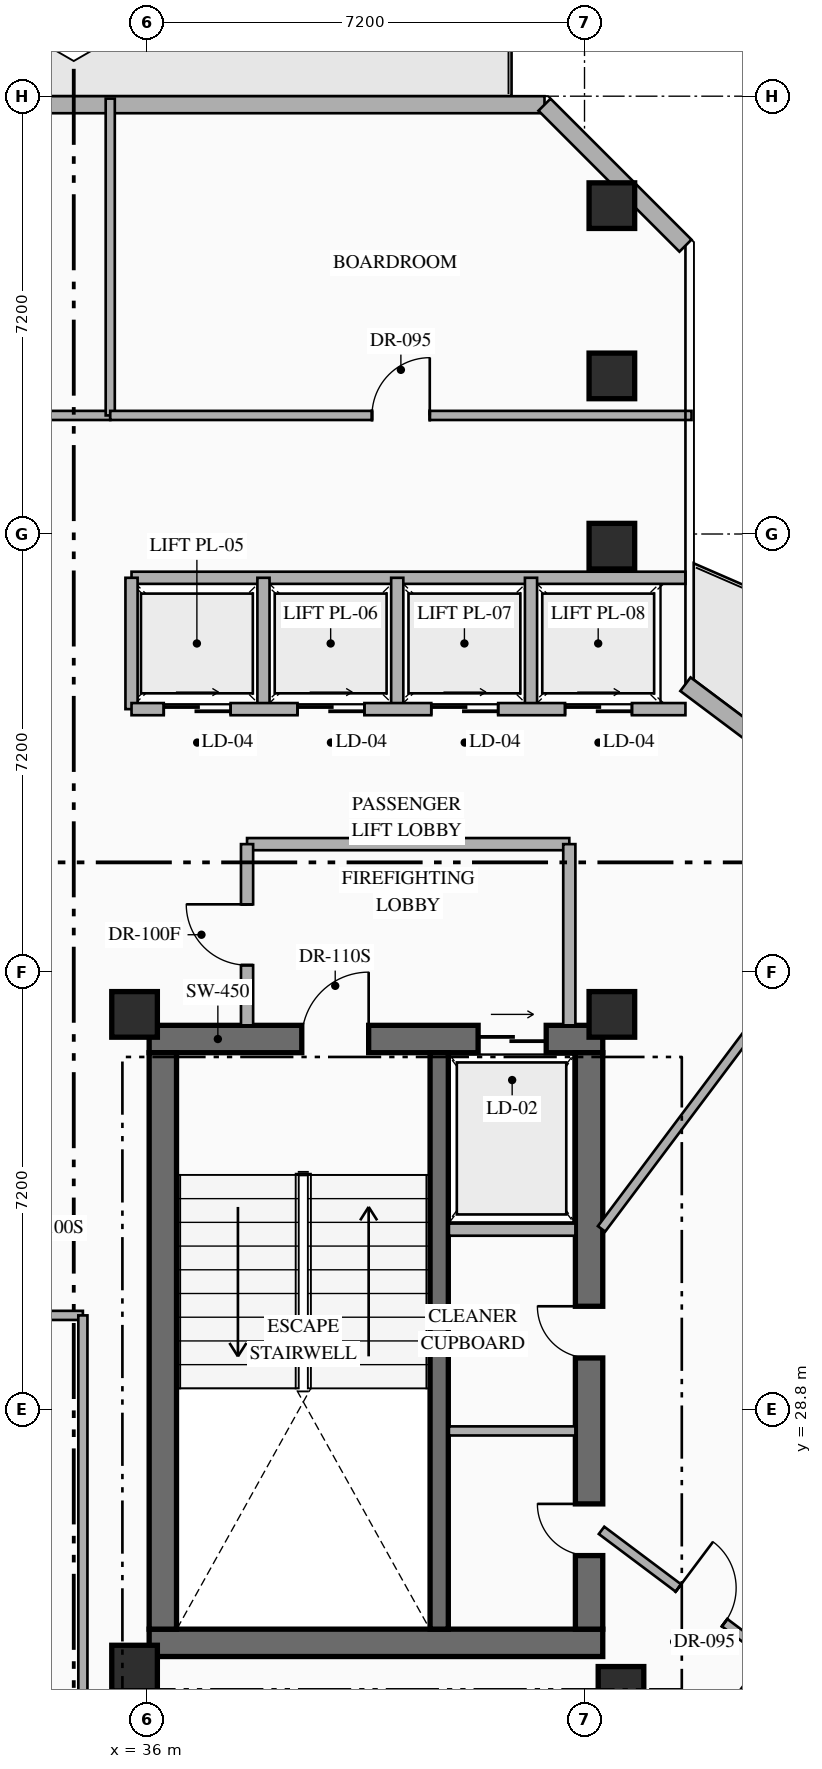
"""IFC4 building model, lengths in metres.
Left out: names, types, materials, properties, quantities, classifications, styles, units other than length and angle.
Written with IfcOpenShell. Run it as: python <this file> out.ifc"""

import sys

from ifc_helpers import new_model, si_unit, direction, frame, frame_2d, origin, origin_2d, place, context, subcontext, project, spatial, rectangle, hollow_rectangle, extrude, element, fill, save


model = new_model("IFC4")
c1 = context("Model", 3, precision=1e-05, world=origin(), true_north=direction((0.0, 1.0)))
c2 = subcontext(c1, "Body", "Model", "MODEL_VIEW")
j1 = project(units=[si_unit("LENGTHUNIT", "METRE"), si_unit("PLANEANGLEUNIT", "RADIAN")], contexts=[c1])
p1 = place(None, origin())
s1 = spatial("IfcSite", under=j1, at=p1, CompositionType="ELEMENT")
p2 = place(p1, origin())
s2 = spatial("IfcBuilding", under=s1, at=p2, CompositionType="ELEMENT")
p3 = place(p2, frame((0.0, 0.0, 202.35)))
s3 = spatial("IfcBuildingStorey", under=s2, at=p3, CompositionType="ELEMENT", Elevation=202.35)
p4 = place(p3, frame((36.04, 24.965, 0.0), z_axis=(0.0, 0.0, 1.0), x_axis=(1.0, 0.0, 0.0)))
e1 = element("IfcWall", 1, at=p4, inside=s3, PredefinedType="SHEAR", context=c2, shape_type="SweptSolid", body=[
    extrude(rectangle(XDim=7.46, YDim=0.45, at=frame_2d((3.73, 0.0))), origin(), (0.0, 0.0, 1.0), 3.6),
])
p5 = place(p3, frame((36.04, 34.895, 0.0), z_axis=(0.0, 0.0, 1.0), x_axis=(1.0, 0.0, 0.0)))
e2 = element("IfcWall", 2, at=p5, inside=s3, PredefinedType="SHEAR", context=c2, shape_type="SweptSolid", body=[
    extrude(rectangle(XDim=7.46, YDim=0.45, at=frame_2d((3.73, 0.0))), origin(), (0.0, 0.0, 1.0), 3.6),
])
p6 = place(p5, frame((2.51, 0.0, 0.0)))
e3 = element("IfcOpeningElement", 3, at=p6, cuts=e2, PredefinedType="OPENING", context=c2, shape_type="SweptSolid", body=[
    extrude(rectangle(XDim=1.1, YDim=2.2, at=frame_2d((0.55, 1.1))), frame((0.0, 0.235, 0.0), z_axis=(0.0, -1.0, 0.0), x_axis=(1.0, 0.0, 0.0)), (0.0, 0.0, 1.0), 0.47),
])
p7 = place(p5, frame((5.41, 0.0, 0.0)))
e4 = element("IfcOpeningElement", 4, at=p7, cuts=e2, PredefinedType="OPENING", context=c2, shape_type="SweptSolid", body=[
    extrude(rectangle(XDim=1.12, YDim=2.15, at=frame_2d((0.56, 1.075))), frame((0.0, 0.235, 0.0), z_axis=(0.0, -1.0, 0.0), x_axis=(1.0, 0.0, 0.0)), (0.0, 0.0, 1.0), 0.47),
])
p8 = place(p3, frame((36.265, 25.19, 0.0), z_axis=(0.0, 0.0, 1.0), x_axis=(0.0, 1.0, 0.0)))
e5 = element("IfcWall", 5, at=p8, inside=s3, PredefinedType="SHEAR", context=c2, shape_type="SweptSolid", body=[
    extrude(rectangle(XDim=9.48, YDim=0.45, at=frame_2d((4.74, 0.0))), origin(), (0.0, 0.0, 1.0), 3.6),
])
p9 = place(p3, frame((43.275, 25.19, 0.0), z_axis=(0.0, 0.0, 1.0), x_axis=(0.0, 1.0, 0.0)))
e6 = element("IfcWall", 6, at=p9, inside=s3, PredefinedType="SHEAR", context=c2, shape_type="SweptSolid", body=[
    extrude(rectangle(XDim=9.48, YDim=0.45, at=frame_2d((4.74, 0.0))), origin(), (0.0, 0.0, 1.0), 3.6),
])
p10 = place(p9, frame((1.21, 0.0, 0.0)))
e7 = element("IfcOpeningElement", 7, at=p10, cuts=e6, PredefinedType="OPENING", context=c2, shape_type="SweptSolid", body=[
    extrude(rectangle(XDim=0.85, YDim=2.08, at=frame_2d((0.425, 1.04))), frame((0.0, 0.235, 0.0), z_axis=(0.0, -1.0, 0.0), x_axis=(1.0, 0.0, 0.0)), (0.0, 0.0, 1.0), 0.47),
])
p11 = place(p9, frame((4.46, 0.0, 0.0)))
e8 = element("IfcOpeningElement", 8, at=p11, cuts=e6, PredefinedType="OPENING", context=c2, shape_type="SweptSolid", body=[
    extrude(rectangle(XDim=0.85, YDim=2.08, at=frame_2d((0.425, 1.04))), frame((0.0, 0.235, 0.0), z_axis=(0.0, -1.0, 0.0), x_axis=(1.0, 0.0, 0.0)), (0.0, 0.0, 1.0), 0.47),
])
p12 = place(p3, frame((40.81, 25.19, 0.0), z_axis=(0.0, 0.0, 1.0), x_axis=(0.0, 1.0, 0.0)))
e9 = element("IfcWall", 9, at=p12, inside=s3, PredefinedType="SHEAR", context=c2, shape_type="SweptSolid", body=[
    extrude(rectangle(XDim=9.48, YDim=0.3, at=frame_2d((4.74, 0.0))), origin(), (0.0, 0.0, 1.0), 3.6),
])
for number, where, z_axis, x_axis in (
    (10, (35.8, 24.55, 0.0), (0.0, 0.0, 1.0), (1.0, 0.0, 0.0)),
    (11, (43.8, 24.2, 0.0), (0.0, 0.0, 1.0), (1.0, 0.0, 0.0)),
    (12, (35.8, 35.3, 0.0), (0.0, 0.0, 1.0), (1.0, 0.0, 0.0)),
    (13, (43.65, 35.3, 0.0), (0.0, 0.0, 1.0), (1.0, 0.0, 0.0)),
    (14, (43.65, 43.0, 0.0), (0.0, 0.0, 1.0), (1.0, 0.0, 0.0)),
    (15, (43.65, 45.8, 0.0), (0.0, 0.0, 1.0), (1.0, 0.0, 0.0)),
    (16, (43.65, 48.6, 0.0), (0.0, 0.0, 1.0), (1.0, 0.0, 0.0)),
):
    element("IfcColumn", number, at=place(p3, frame(where, z_axis=z_axis, x_axis=x_axis)), inside=s3, PredefinedType="COLUMN", context=c2, shape_type="SweptSolid", body=[
        extrude(hollow_rectangle(XDim=0.75, YDim=0.75, WallThickness=0.028, at=origin_2d()), origin(), (0.0, 0.0, 1.0), 3.6),
    ])
p13 = place(p3, frame((44.86, 40.73, 0.0), z_axis=(0.0, 0.0, 1.0), x_axis=(0.800007624502, -0.599989833863, 0.0)))
e17 = element("IfcWall", 17, at=p13, inside=s3, PredefinedType="STANDARD", context=c2, shape_type="SweptSolid", body=[
    extrude(rectangle(XDim=19.212, YDim=0.28, at=frame_2d((9.606, 0.0))), origin(), (0.0, 0.0, 1.0), 3.35),
])
p14 = place(p13, frame((1.755, 0.0, 0.0)))
e18 = element("IfcOpeningElement", 18, at=p14, cuts=e17, PredefinedType="OPENING", context=c2, shape_type="SweptSolid", body=[
    extrude(rectangle(XDim=1.1, YDim=2.2, at=frame_2d((0.55, 1.1))), frame((0.0, 0.15, 0.0), z_axis=(0.0, -1.0, 0.0), x_axis=(1.0, 0.0, 0.0)), (0.0, 0.0, 1.0), 0.3),
])
p15 = place(p13, frame((13.509, 0.0, 0.85)))
e19 = element("IfcOpeningElement", 19, at=p15, cuts=e17, PredefinedType="OPENING", context=c2, shape_type="SweptSolid", body=[
    extrude(rectangle(XDim=1.8, YDim=2.1, at=frame_2d((0.9, 1.05))), frame((0.0, 0.15, 0.0), z_axis=(0.0, -1.0, 0.0), x_axis=(1.0, 0.0, 0.0)), (0.0, 0.0, 1.0), 0.3),
])
p16 = place(p3, frame((20.458, 50.26, 0.0), z_axis=(0.0, 0.0, 1.0), x_axis=(1.0, 0.0, 0.0)))
e20 = element("IfcWall", 20, at=p16, inside=s3, PredefinedType="STANDARD", context=c2, shape_type="SweptSolid", body=[
    extrude(rectangle(XDim=22.084, YDim=0.28, at=frame_2d((11.042, 0.0))), origin(), (0.0, 0.0, 1.0), 3.35),
])
p17 = place(p16, frame((2.1, 0.0, 0.0)))
e21 = element("IfcOpeningElement", 21, at=p17, cuts=e20, PredefinedType="OPENING", context=c2, shape_type="SweptSolid", body=[
    extrude(rectangle(XDim=1.1, YDim=2.2, at=frame_2d((0.55, 1.1))), frame((0.0, 0.15, 0.0), z_axis=(0.0, -1.0, 0.0), x_axis=(1.0, 0.0, 0.0)), (0.0, 0.0, 1.0), 0.3),
])
p18 = place(p3, frame((42.542, 50.26, 0.0), z_axis=(0.0, 0.0, 1.0), x_axis=(0.707106781187, -0.707106781187, 0.0)))
e22 = element("IfcWall", 22, at=p18, inside=s3, PredefinedType="STANDARD", context=c2, shape_type="SweptSolid", body=[
    extrude(rectangle(XDim=3.278, YDim=0.28, at=frame_2d((1.639, 0.0))), origin(), (0.0, 0.0, 1.0), 3.35),
])
p19 = place(p3, frame((40.97, 31.76, 0.0), z_axis=(0.0, 0.0, 1.0), x_axis=(1.0, 0.0, 0.0)))
e23 = element("IfcWall", 23, at=p19, inside=s3, PredefinedType="STANDARD", context=c2, shape_type="SweptSolid", body=[
    extrude(rectangle(XDim=2.08, YDim=0.2, at=frame_2d((1.04, 0.0))), origin(), (0.0, 0.0, 1.0), 3.35),
])
p20 = place(p3, frame((40.97, 28.45, 0.0), z_axis=(0.0, 0.0, 1.0), x_axis=(1.0, 0.0, 0.0)))
e24 = element("IfcWall", 24, at=p20, inside=s3, PredefinedType="PARTITIONING", context=c2, shape_type="SweptSolid", body=[
    extrude(rectangle(XDim=2.08, YDim=0.15, at=frame_2d((1.04, 0.0))), origin(), (0.0, 0.0, 1.0), 3.35),
])
p21 = place(p3, frame((37.65, 38.1, 0.0), z_axis=(0.0, 0.0, 1.0), x_axis=(1.0, 0.0, 0.0)))
e25 = element("IfcWall", 25, at=p21, inside=s3, PredefinedType="STANDARD", context=c2, shape_type="SweptSolid", body=[
    extrude(rectangle(XDim=5.3, YDim=0.2, at=frame_2d((2.65, 0.0))), origin(), (0.0, 0.0, 1.0), 3.35),
])
p22 = place(p3, frame((42.95, 35.12, 0.0), z_axis=(0.0, 0.0, 1.0), x_axis=(0.0, 1.0, 0.0)))
e26 = element("IfcWall", 26, at=p22, inside=s3, PredefinedType="STANDARD", context=c2, shape_type="SweptSolid", body=[
    extrude(rectangle(XDim=2.98, YDim=0.2, at=frame_2d((1.49, 0.0))), origin(), (0.0, 0.0, 1.0), 3.35),
])
p23 = place(p3, frame((37.65, 35.12, 0.0), z_axis=(0.0, 0.0, 1.0), x_axis=(0.0, 1.0, 0.0)))
e27 = element("IfcWall", 27, at=p23, inside=s3, PredefinedType="STANDARD", context=c2, shape_type="SweptSolid", body=[
    extrude(rectangle(XDim=2.98, YDim=0.2, at=frame_2d((1.49, 0.0))), origin(), (0.0, 0.0, 1.0), 3.35),
])
p24 = place(p23, frame((0.99, 0.0, 0.0)))
e28 = element("IfcOpeningElement", 28, at=p24, cuts=e27, PredefinedType="OPENING", context=c2, shape_type="SweptSolid", body=[
    extrude(rectangle(XDim=1.0, YDim=2.2, at=frame_2d((0.5, 1.1))), frame((0.0, 0.11, 0.0), z_axis=(0.0, -1.0, 0.0), x_axis=(1.0, 0.0, 0.0)), (0.0, 0.0, 1.0), 0.22),
])
p25 = place(p3, frame((35.75, 42.48, 0.0), z_axis=(0.0, 0.0, 1.0), x_axis=(1.0, 0.0, 0.0)))
e29 = element("IfcWall", 29, at=p25, inside=s3, PredefinedType="STANDARD", context=c2, shape_type="SweptSolid", body=[
    extrude(rectangle(XDim=9.11, YDim=0.2, at=frame_2d((4.555, 0.0))), origin(), (0.0, 0.0, 1.0), 3.35),
])
for number, where, z_axis, x_axis in (
    (30, (35.75, 40.32, 0.0), (0.0, 0.0, 1.0), (0.0, 1.0, 0.0)),
    (31, (37.92, 40.32, 0.0), (0.0, 0.0, 1.0), (0.0, 1.0, 0.0)),
    (32, (40.12, 40.32, 0.0), (0.0, 0.0, 1.0), (0.0, 1.0, 0.0)),
    (33, (42.32, 40.32, 0.0), (0.0, 0.0, 1.0), (0.0, 1.0, 0.0)),
):
    element("IfcWall", number, at=place(p3, frame(where, z_axis=z_axis, x_axis=x_axis)), inside=s3, PredefinedType="STANDARD", context=c2, shape_type="SweptSolid", body=[
        extrude(rectangle(XDim=2.16, YDim=0.2, at=frame_2d((1.08, 0.0))), origin(), (0.0, 0.0, 1.0), 3.35),
    ])
p26 = place(p3, frame((35.75, 40.32, 0.0), z_axis=(0.0, 0.0, 1.0), x_axis=(1.0, 0.0, 0.0)))
e34 = element("IfcWall", 34, at=p26, inside=s3, PredefinedType="STANDARD", context=c2, shape_type="SweptSolid", body=[
    extrude(rectangle(XDim=9.11, YDim=0.2, at=frame_2d((4.555, 0.0))), origin(), (0.0, 0.0, 1.0), 3.35),
])
p27 = place(p26, frame((0.53, 0.0, 0.0)))
e35 = element("IfcOpeningElement", 35, at=p27, cuts=e34, PredefinedType="OPENING", context=c2, shape_type="SweptSolid", body=[
    extrude(rectangle(XDim=1.1, YDim=2.18, at=frame_2d((0.55, 1.09))), frame((0.0, 0.11, 0.0), z_axis=(0.0, -1.0, 0.0), x_axis=(1.0, 0.0, 0.0)), (0.0, 0.0, 1.0), 0.22),
])
p28 = place(p26, frame((2.73, 0.0, 0.0)))
e36 = element("IfcOpeningElement", 36, at=p28, cuts=e34, PredefinedType="OPENING", context=c2, shape_type="SweptSolid", body=[
    extrude(rectangle(XDim=1.1, YDim=2.18, at=frame_2d((0.55, 1.09))), frame((0.0, 0.11, 0.0), z_axis=(0.0, -1.0, 0.0), x_axis=(1.0, 0.0, 0.0)), (0.0, 0.0, 1.0), 0.22),
])
p29 = place(p26, frame((4.93, 0.0, 0.0)))
e37 = element("IfcOpeningElement", 37, at=p29, cuts=e34, PredefinedType="OPENING", context=c2, shape_type="SweptSolid", body=[
    extrude(rectangle(XDim=1.1, YDim=2.18, at=frame_2d((0.55, 1.09))), frame((0.0, 0.11, 0.0), z_axis=(0.0, -1.0, 0.0), x_axis=(1.0, 0.0, 0.0)), (0.0, 0.0, 1.0), 0.22),
])
p30 = place(p26, frame((7.13, 0.0, 0.0)))
e38 = element("IfcOpeningElement", 38, at=p30, cuts=e34, PredefinedType="OPENING", context=c2, shape_type="SweptSolid", body=[
    extrude(rectangle(XDim=1.1, YDim=2.18, at=frame_2d((0.55, 1.09))), frame((0.0, 0.11, 0.0), z_axis=(0.0, -1.0, 0.0), x_axis=(1.0, 0.0, 0.0)), (0.0, 0.0, 1.0), 0.22),
])
p31 = place(p3, frame((25.55, 30.35, 0.0), z_axis=(0.0, 0.0, 1.0), x_axis=(1.0, 0.0, 0.0)))
e39 = element("IfcWall", 39, at=p31, inside=s3, PredefinedType="PARTITIONING", context=c2, shape_type="SweptSolid", body=[
    extrude(rectangle(XDim=9.4, YDim=0.15, at=frame_2d((4.7, 0.0))), origin(), (0.0, 0.0, 1.0), 3.35),
])
p32 = place(p31, frame((7.638, 0.0, 0.0)))
e40 = element("IfcOpeningElement", 40, at=p32, cuts=e39, PredefinedType="OPENING", context=c2, shape_type="SweptSolid", body=[
    extrude(rectangle(XDim=1.0, YDim=2.15, at=frame_2d((0.5, 1.075))), frame((0.0, 0.085, 0.0), z_axis=(0.0, -1.0, 0.0), x_axis=(1.0, 0.0, 0.0)), (0.0, 0.0, 1.0), 0.17),
])
p33 = place(p3, frame((34.95, 23.2, 0.0), z_axis=(0.0, 0.0, 1.0), x_axis=(0.0, 1.0, 0.0)))
e41 = element("IfcWall", 41, at=p33, inside=s3, PredefinedType="PARTITIONING", context=c2, shape_type="SweptSolid", body=[
    extrude(rectangle(XDim=7.15, YDim=0.15, at=frame_2d((3.575, 0.0))), origin(), (0.0, 0.0, 1.0), 3.35),
])
p34 = place(p3, frame((26.8, 45.15, 0.0), z_axis=(0.0, 0.0, 1.0), x_axis=(1.0, 0.0, 0.0)))
e42 = element("IfcWall", 42, at=p34, inside=s3, PredefinedType="PARTITIONING", context=c2, shape_type="SweptSolid", body=[
    extrude(rectangle(XDim=8.6, YDim=0.15, at=frame_2d((4.3, 0.0))), origin(), (0.0, 0.0, 1.0), 3.35),
])
p35 = place(p34, frame((3.825, 0.0, 0.0)))
e43 = element("IfcOpeningElement", 43, at=p35, cuts=e42, PredefinedType="OPENING", context=c2, shape_type="SweptSolid", body=[
    extrude(rectangle(XDim=0.95, YDim=2.15, at=frame_2d((0.475, 1.075))), frame((0.0, 0.085, 0.0), z_axis=(0.0, -1.0, 0.0), x_axis=(1.0, 0.0, 0.0)), (0.0, 0.0, 1.0), 0.17),
])
p36 = place(p3, frame((35.4, 45.15, 0.0), z_axis=(0.0, 0.0, 1.0), x_axis=(0.0, 1.0, 0.0)))
e44 = element("IfcWall", 44, at=p36, inside=s3, PredefinedType="PARTITIONING", context=c2, shape_type="SweptSolid", body=[
    extrude(rectangle(XDim=5.21, YDim=0.15, at=frame_2d((2.605, 0.0))), origin(), (0.0, 0.0, 1.0), 3.35),
])
p37 = place(p3, frame((35.4, 45.15, 0.0), z_axis=(0.0, 0.0, 1.0), x_axis=(1.0, 0.0, 0.0)))
e45 = element("IfcWall", 45, at=p37, inside=s3, PredefinedType="PARTITIONING", context=c2, shape_type="SweptSolid", body=[
    extrude(rectangle(XDim=9.56, YDim=0.15, at=frame_2d((4.78, 0.0))), origin(), (0.0, 0.0, 1.0), 3.35),
])
p38 = place(p37, frame((4.305, 0.0, 0.0)))
e46 = element("IfcOpeningElement", 46, at=p38, cuts=e45, PredefinedType="OPENING", context=c2, shape_type="SweptSolid", body=[
    extrude(rectangle(XDim=0.95, YDim=2.15, at=frame_2d((0.475, 1.075))), frame((0.0, 0.085, 0.0), z_axis=(0.0, -1.0, 0.0), x_axis=(1.0, 0.0, 0.0)), (0.0, 0.0, 1.0), 0.17),
])
p39 = place(p3, frame((38.064, 13.802, 0.0), z_axis=(0.0, 0.0, 1.0), x_axis=(0.599997031734, 0.800002226191, 0.0)))
e47 = element("IfcWall", 47, at=p39, inside=s3, PredefinedType="PARTITIONING", context=c2, shape_type="SweptSolid", body=[
    extrude(rectangle(XDim=13.16, YDim=0.15, at=frame_2d((6.58, 0.0))), origin(), (0.0, 0.0, 1.0), 3.35),
])
p40 = place(p39, frame((6.105, 0.0, 0.0)))
e48 = element("IfcOpeningElement", 48, at=p40, cuts=e47, PredefinedType="OPENING", context=c2, shape_type="SweptSolid", body=[
    extrude(rectangle(XDim=0.95, YDim=2.15, at=frame_2d((0.475, 1.075))), frame((0.0, 0.085, 0.0), z_axis=(0.0, -1.0, 0.0), x_axis=(1.0, 0.0, 0.0)), (0.0, 0.0, 1.0), 0.17),
])
p41 = place(p3, frame((43.48, 26.815, 0.0), z_axis=(0.0, 0.0, 1.0), x_axis=(0.800008430676, -0.599988758934, 0.0)))
e49 = element("IfcWall", 49, at=p41, inside=s3, PredefinedType="PARTITIONING", context=c2, shape_type="SweptSolid", body=[
    extrude(rectangle(XDim=3.475, YDim=0.15, at=frame_2d((1.738, 0.0))), origin(), (0.0, 0.0, 1.0), 3.35),
])
p42 = place(p41, frame((1.58, 0.0, 0.0)))
e50 = element("IfcOpeningElement", 50, at=p42, cuts=e49, PredefinedType="OPENING", context=c2, shape_type="SweptSolid", body=[
    extrude(rectangle(XDim=0.95, YDim=2.15, at=frame_2d((0.475, 1.075))), frame((0.0, 0.085, 0.0), z_axis=(0.0, -1.0, 0.0), x_axis=(1.0, 0.0, 0.0)), (0.0, 0.0, 1.0), 0.17),
])
p43 = place(p3, frame((43.48, 31.773, 0.0), z_axis=(0.0, 0.0, 1.0), x_axis=(0.599971041729, 0.800021717885, 0.0)))
e51 = element("IfcWall", 51, at=p43, inside=s3, PredefinedType="PARTITIONING", context=c2, shape_type="SweptSolid", body=[
    extrude(rectangle(XDim=8.094, YDim=0.15, at=frame_2d((4.047, 0.0))), origin(), (0.0, 0.0, 1.0), 3.35),
])
p44 = place(p6, origin())
e52 = element("IfcDoor", 52, at=p44, inside=s3, OperationType="SINGLE_SWING_RIGHT", PredefinedType="DOOR", context=c2, shape_type="SweptSolid", body=[
    extrude(rectangle(XDim=1.1, YDim=2.2, at=frame_2d((0.55, 1.1))), frame((0.0, 0.025, 0.0), z_axis=(0.0, -1.0, 0.0), x_axis=(1.0, 0.0, 0.0)), (0.0, 0.0, 1.0), 0.05),
])
fill(e3, e52)
p45 = place(p7, origin())
e53 = element("IfcDoor", 53, at=p45, inside=s3, OperationType="SLIDING_TO_RIGHT", PredefinedType="USERDEFINED", context=c2, shape_type="SweptSolid", body=[
    extrude(rectangle(XDim=1.12, YDim=2.15, at=frame_2d((0.56, 1.075))), frame((0.0, 0.025, 0.0), z_axis=(0.0, -1.0, 0.0), x_axis=(1.0, 0.0, 0.0)), (0.0, 0.0, 1.0), 0.05),
])
fill(e4, e53)
p46 = place(p10, origin())
e54 = element("IfcDoor", 54, at=p46, inside=s3, OperationType="SINGLE_SWING_RIGHT", PredefinedType="DOOR", context=c2, shape_type="SweptSolid", body=[
    extrude(rectangle(XDim=0.85, YDim=2.08, at=frame_2d((0.425, 1.04))), frame((0.0, 0.025, 0.0), z_axis=(0.0, -1.0, 0.0), x_axis=(1.0, 0.0, 0.0)), (0.0, 0.0, 1.0), 0.05),
])
fill(e7, e54)
p47 = place(p11, origin())
e55 = element("IfcDoor", 55, at=p47, inside=s3, OperationType="SINGLE_SWING_RIGHT", PredefinedType="DOOR", context=c2, shape_type="SweptSolid", body=[
    extrude(rectangle(XDim=0.85, YDim=2.08, at=frame_2d((0.425, 1.04))), frame((0.0, 0.025, 0.0), z_axis=(0.0, -1.0, 0.0), x_axis=(1.0, 0.0, 0.0)), (0.0, 0.0, 1.0), 0.05),
])
fill(e8, e55)
p48 = place(p24, origin())
e56 = element("IfcDoor", 56, at=p48, inside=s3, OperationType="SINGLE_SWING_RIGHT", PredefinedType="DOOR", context=c2, shape_type="SweptSolid", body=[
    extrude(rectangle(XDim=1.0, YDim=2.2, at=frame_2d((0.5, 1.1))), frame((0.0, 0.025, 0.0), z_axis=(0.0, -1.0, 0.0), x_axis=(1.0, 0.0, 0.0)), (0.0, 0.0, 1.0), 0.05),
])
fill(e28, e56)
p49 = place(p27, origin())
e57 = element("IfcDoor", 57, at=p49, inside=s3, OperationType="SLIDING_TO_RIGHT", PredefinedType="USERDEFINED", context=c2, shape_type="SweptSolid", body=[
    extrude(rectangle(XDim=1.1, YDim=2.18, at=frame_2d((0.55, 1.09))), frame((0.0, 0.025, 0.0), z_axis=(0.0, -1.0, 0.0), x_axis=(1.0, 0.0, 0.0)), (0.0, 0.0, 1.0), 0.05),
])
fill(e35, e57)
p50 = place(p28, origin())
e58 = element("IfcDoor", 58, at=p50, inside=s3, OperationType="SLIDING_TO_RIGHT", PredefinedType="USERDEFINED", context=c2, shape_type="SweptSolid", body=[
    extrude(rectangle(XDim=1.1, YDim=2.18, at=frame_2d((0.55, 1.09))), frame((0.0, 0.025, 0.0), z_axis=(0.0, -1.0, 0.0), x_axis=(1.0, 0.0, 0.0)), (0.0, 0.0, 1.0), 0.05),
])
fill(e36, e58)
p51 = place(p29, origin())
e59 = element("IfcDoor", 59, at=p51, inside=s3, OperationType="SLIDING_TO_RIGHT", PredefinedType="USERDEFINED", context=c2, shape_type="SweptSolid", body=[
    extrude(rectangle(XDim=1.1, YDim=2.18, at=frame_2d((0.55, 1.09))), frame((0.0, 0.025, 0.0), z_axis=(0.0, -1.0, 0.0), x_axis=(1.0, 0.0, 0.0)), (0.0, 0.0, 1.0), 0.05),
])
fill(e37, e59)
p52 = place(p30, origin())
e60 = element("IfcDoor", 60, at=p52, inside=s3, OperationType="SLIDING_TO_RIGHT", PredefinedType="USERDEFINED", context=c2, shape_type="SweptSolid", body=[
    extrude(rectangle(XDim=1.1, YDim=2.18, at=frame_2d((0.55, 1.09))), frame((0.0, 0.025, 0.0), z_axis=(0.0, -1.0, 0.0), x_axis=(1.0, 0.0, 0.0)), (0.0, 0.0, 1.0), 0.05),
])
fill(e38, e60)
p53 = place(p38, origin())
e61 = element("IfcDoor", 61, at=p53, inside=s3, OperationType="SINGLE_SWING_RIGHT", PredefinedType="DOOR", context=c2, shape_type="SweptSolid", body=[
    extrude(rectangle(XDim=0.95, YDim=2.15, at=frame_2d((0.475, 1.075))), frame((0.0, 0.025, 0.0), z_axis=(0.0, -1.0, 0.0), x_axis=(1.0, 0.0, 0.0)), (0.0, 0.0, 1.0), 0.05),
])
fill(e46, e61)
p54 = place(p42, origin())
e62 = element("IfcDoor", 62, at=p54, inside=s3, OperationType="SINGLE_SWING_LEFT", PredefinedType="DOOR", context=c2, shape_type="SweptSolid", body=[
    extrude(rectangle(XDim=0.95, YDim=2.15, at=frame_2d((0.475, 1.075))), frame((0.0, 0.025, 0.0), z_axis=(0.0, -1.0, 0.0), x_axis=(1.0, 0.0, 0.0)), (0.0, 0.0, 1.0), 0.05),
])
fill(e50, e62)
save(model, sys.argv[1])
